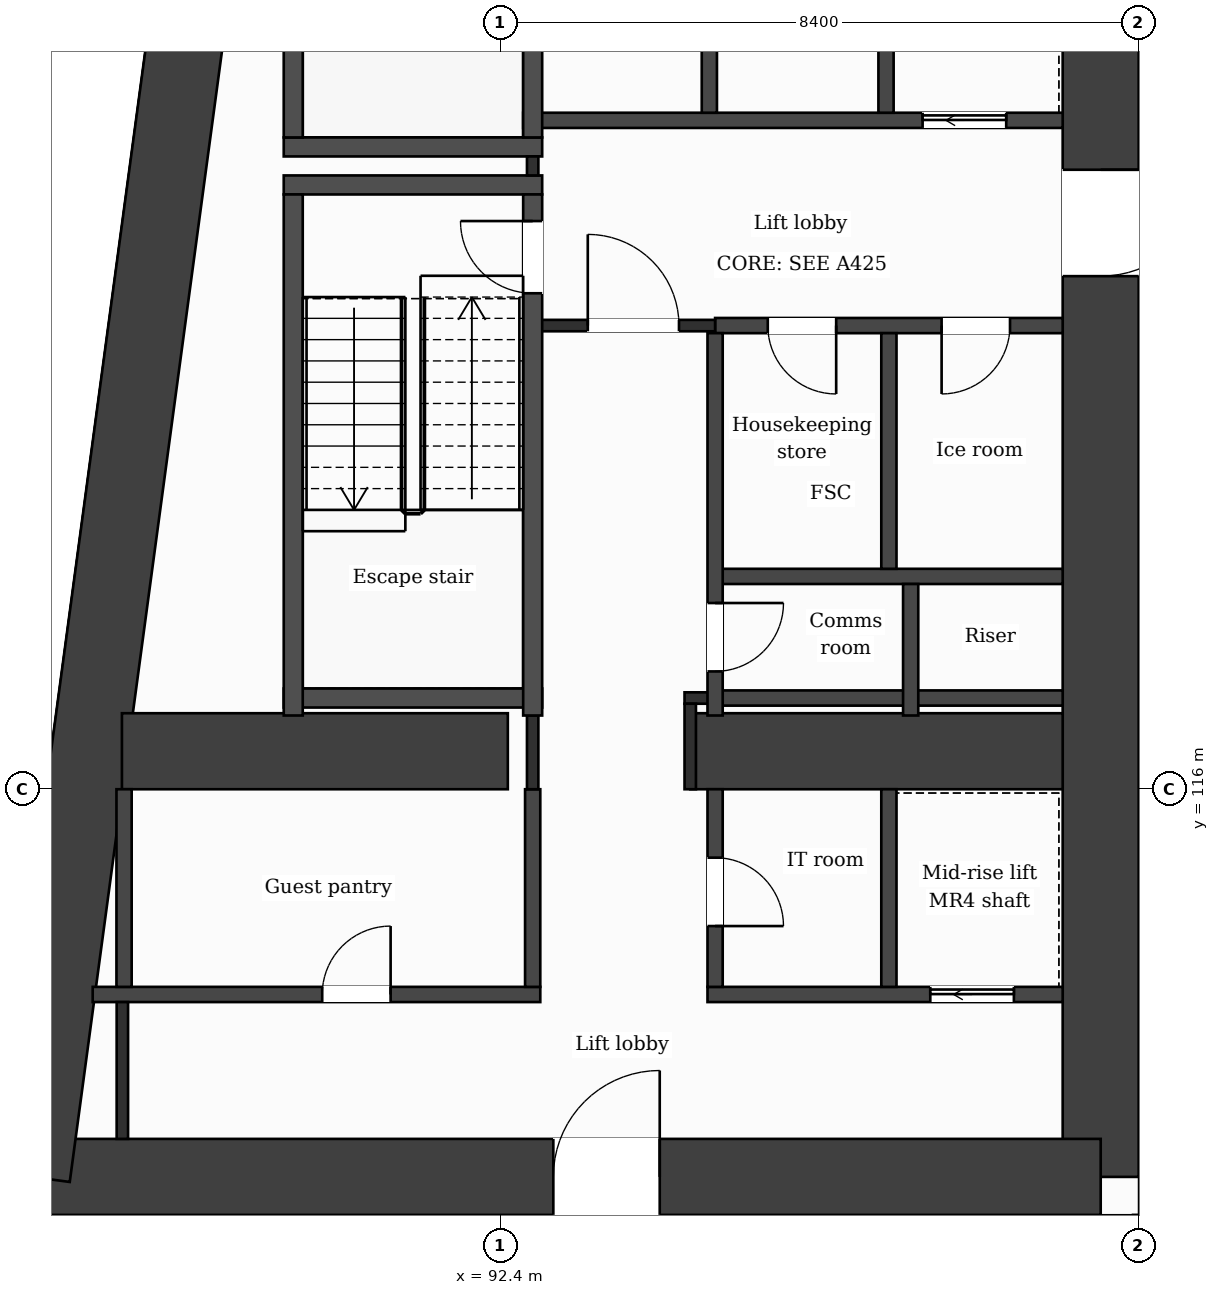
"""IFC4 building model, lengths in metres.
Left out: names, types, materials, properties, quantities, classifications, styles, units other than length and angle.
Written with IfcOpenShell. Run it as: python <this file> out.ifc"""

import sys

from ifc_helpers import new_model, si_unit, direction, frame, frame_2d, origin, place, context, subcontext, project, spatial, rectangle, extrude, element, fill, save


model = new_model("IFC4")
c1 = context("Model", 3, precision=1e-05, world=origin(), true_north=direction((0.0, 1.0)))
c2 = subcontext(c1, "Body", "Model", "MODEL_VIEW")
j1 = project(units=[si_unit("LENGTHUNIT", "METRE"), si_unit("PLANEANGLEUNIT", "RADIAN")], contexts=[c1])
p1 = place(None, origin())
s1 = spatial("IfcSite", under=j1, at=p1, CompositionType="ELEMENT")
p2 = place(p1, origin())
s2 = spatial("IfcBuilding", under=s1, at=p2, CompositionType="ELEMENT")
p3 = place(p2, frame((0.0, 0.0, 105.8)))
s3 = spatial("IfcBuildingStorey", under=s2, at=p3, CompositionType="ELEMENT", Elevation=105.8)
p4 = place(p3, frame((100.3, 131.9, 0.0), z_axis=(0.0, 0.0, 1.0), x_axis=(0.0, -1.0, 0.0)))
e1 = element("IfcWall", 1, at=p4, inside=s3, PredefinedType="SHEAR", context=c2, shape_type="SweptSolid", body=[
    extrude(rectangle(XDim=21.0, YDim=1.0, at=frame_2d((10.5, 0.0))), origin(), (0.0, 0.0, 1.0), 3.7),
])
p5 = place(p4, frame((7.75, 0.0, 0.0)))
e2 = element("IfcOpeningElement", 2, at=p5, cuts=e1, PredefinedType="OPENING", context=c2, shape_type="SweptSolid", body=[
    extrude(rectangle(XDim=1.4, YDim=2.1, at=frame_2d((0.7, 1.05))), frame((0.0, 0.51, 0.0), z_axis=(0.0, -1.0, 0.0), x_axis=(1.0, 0.0, 0.0)), (0.0, 0.0, 1.0), 1.02),
])
p6 = place(p3, frame((100.3, 110.9, 0.0), z_axis=(0.0, 0.0, 1.0), x_axis=(-1.0, 0.0, 0.0)))
e3 = element("IfcWall", 3, at=p6, inside=s3, PredefinedType="SHEAR", context=c2, shape_type="SweptSolid", body=[
    extrude(rectangle(XDim=14.059, YDim=1.0, at=frame_2d((7.03, 0.0))), origin(), (0.0, 0.0, 1.0), 3.7),
])
p7 = place(p6, frame((5.802, 0.0, 0.0)))
e4 = element("IfcOpeningElement", 4, at=p7, cuts=e3, PredefinedType="OPENING", context=c2, shape_type="SweptSolid", body=[
    extrude(rectangle(XDim=1.4, YDim=2.1, at=frame_2d((0.7, 1.05))), frame((0.0, 0.51, 0.0), z_axis=(0.0, -1.0, 0.0), x_axis=(1.0, 0.0, 0.0)), (0.0, 0.0, 1.0), 1.02),
])
p8 = place(p3, frame((86.241, 110.9, 0.0), z_axis=(0.0, 0.0, 1.0), x_axis=(0.133411141623, 0.991060778808, 0.0)))
e5 = element("IfcWall", 5, at=p8, inside=s3, PredefinedType="SHEAR", context=c2, shape_type="SweptSolid", body=[
    extrude(rectangle(XDim=21.189, YDim=1.0, at=frame_2d((10.595, 0.0))), origin(), (0.0, 0.0, 1.0), 3.7),
])
p9 = place(p3, frame((87.423, 116.5, 0.0), z_axis=(0.0, 0.0, 1.0), x_axis=(1.0, 0.0, 0.0)))
e6 = element("IfcWall", 6, at=p9, inside=s3, PredefinedType="SHEAR", context=c2, shape_type="SweptSolid", body=[
    extrude(rectangle(XDim=5.077, YDim=1.0, at=frame_2d((2.539, 0.0))), origin(), (0.0, 0.0, 1.0), 3.7),
])
p10 = place(p3, frame((94.9, 116.5, 0.0), z_axis=(0.0, 0.0, 1.0), x_axis=(1.0, 0.0, 0.0)))
e7 = element("IfcWall", 7, at=p10, inside=s3, PredefinedType="SHEAR", context=c2, shape_type="SweptSolid", body=[
    extrude(rectangle(XDim=4.9, YDim=1.0, at=frame_2d((2.45, 0.0))), origin(), (0.0, 0.0, 1.0), 3.7),
])
p11 = place(p3, frame((87.334, 110.4, 0.0), z_axis=(0.0, 0.0, 1.0), x_axis=(-0.133437175554, -0.991057273915, 0.0)))
e8 = element("IfcWall", 8, at=p11, inside=s3, PredefinedType="SOLIDWALL", context=c2, shape_type="SweptSolid", body=[
    extrude(rectangle(XDim=6.781, YDim=0.3, at=frame_2d((3.39, 0.0))), origin(), (0.0, 0.0, 1.0), 3.38),
])
p12 = place(p11, frame((1.418, 0.0, 0.0)))
e9 = element("IfcOpeningElement", 9, at=p12, cuts=e8, PredefinedType="OPENING", context=c2, shape_type="SweptSolid", body=[
    extrude(rectangle(XDim=1.2, YDim=2.4, at=frame_2d((0.6, 1.2))), frame((0.0, 0.16, 0.0), z_axis=(0.0, -1.0, 0.0), x_axis=(1.0, 0.0, 0.0)), (0.0, 0.0, 1.0), 0.32),
])
p13 = place(p11, frame((4.758, 0.0, 0.9)))
e10 = element("IfcOpeningElement", 10, at=p13, cuts=e8, PredefinedType="OPENING", context=c2, shape_type="SweptSolid", body=[
    extrude(rectangle(XDim=1.2, YDim=2.1, at=frame_2d((0.6, 1.05))), frame((0.0, 0.16, 0.0), z_axis=(0.0, -1.0, 0.0), x_axis=(1.0, 0.0, 0.0)), (0.0, 0.0, 1.0), 0.32),
])
p14 = place(p3, frame((87.039, 113.3, 0.0), z_axis=(0.0, 0.0, 1.0), x_axis=(1.0, 0.0, 0.0)))
e11 = element("IfcWall", 11, at=p14, inside=s3, PredefinedType="PARTITIONING", context=c2, shape_type="SweptSolid", body=[
    extrude(rectangle(XDim=5.888, YDim=0.2, at=frame_2d((2.944, 0.0))), origin(), (0.0, 0.0, 1.0), 3.38),
])
p15 = place(p14, frame((3.019, 0.0, 0.0)))
e12 = element("IfcOpeningElement", 12, at=p15, cuts=e11, PredefinedType="OPENING", context=c2, shape_type="SweptSolid", body=[
    extrude(rectangle(XDim=0.9, YDim=2.1, at=frame_2d((0.45, 1.05))), frame((0.0, 0.11, 0.0), z_axis=(0.0, -1.0, 0.0), x_axis=(1.0, 0.0, 0.0)), (0.0, 0.0, 1.0), 0.22),
])
p16 = place(p3, frame((95.127, 113.3, 0.0), z_axis=(0.0, 0.0, 1.0), x_axis=(1.0, 0.0, 0.0)))
e13 = element("IfcWall", 13, at=p16, inside=s3, PredefinedType="PARTITIONING", context=c2, shape_type="SweptSolid", body=[
    extrude(rectangle(XDim=4.673, YDim=0.2, at=frame_2d((2.336, 0.0))), origin(), (0.0, 0.0, 1.0), 3.38),
])
p17 = place(p16, frame((2.931, 0.0, 0.0)))
e14 = element("IfcOpeningElement", 14, at=p17, cuts=e13, PredefinedType="OPENING", context=c2, shape_type="SweptSolid", body=[
    extrude(rectangle(XDim=1.1, YDim=2.1, at=frame_2d((0.55, 1.05))), frame((0.0, 0.11, 0.0), z_axis=(0.0, -1.0, 0.0), x_axis=(1.0, 0.0, 0.0)), (0.0, 0.0, 1.0), 0.22),
])
p18 = place(p3, frame((95.227, 117.2, 0.0), z_axis=(0.0, 0.0, 1.0), x_axis=(1.0, 0.0, 0.0)))
e15 = element("IfcWall", 15, at=p18, inside=s3, PredefinedType="PARTITIONING", context=c2, shape_type="SweptSolid", body=[
    extrude(rectangle(XDim=4.573, YDim=0.2, at=frame_2d((2.287, 0.0))), origin(), (0.0, 0.0, 1.0), 3.38),
])
p19 = place(p3, frame((94.825, 117.2, 0.0), z_axis=(0.0, 0.0, 1.0), x_axis=(1.0, 0.0, 0.0)))
e16 = element("IfcWall", 16, at=p19, inside=s3, PredefinedType="PARTITIONING", context=c2, shape_type="SweptSolid", body=[
    extrude(rectangle(XDim=0.402, YDim=0.15, at=frame_2d((0.201, 0.0))), origin(), (0.0, 0.0, 1.0), 3.38),
])
p20 = place(p3, frame((89.552, 117.2, 0.0), z_axis=(0.0, 0.0, 1.0), x_axis=(1.0, 0.0, 0.0)))
e17 = element("IfcWall", 17, at=p20, inside=s3, PredefinedType="PARTITIONING", context=c2, shape_type="SweptSolid", body=[
    extrude(rectangle(XDim=3.4, YDim=0.25, at=frame_2d((1.7, 0.0))), origin(), (0.0, 0.0, 1.0), 3.38),
])
p21 = place(p3, frame((95.227, 118.8, 0.0), z_axis=(0.0, 0.0, 1.0), x_axis=(1.0, 0.0, 0.0)))
e18 = element("IfcWall", 18, at=p21, inside=s3, PredefinedType="PARTITIONING", context=c2, shape_type="SweptSolid", body=[
    extrude(rectangle(XDim=4.573, YDim=0.2, at=frame_2d((2.287, 0.0))), origin(), (0.0, 0.0, 1.0), 3.38),
])
p22 = place(p3, frame((95.227, 122.1, 0.0), z_axis=(0.0, 0.0, 1.0), x_axis=(1.0, 0.0, 0.0)))
e19 = element("IfcWall", 19, at=p22, inside=s3, PredefinedType="PARTITIONING", context=c2, shape_type="SweptSolid", body=[
    extrude(rectangle(XDim=4.573, YDim=0.2, at=frame_2d((2.287, 0.0))), origin(), (0.0, 0.0, 1.0), 3.38),
])
p23 = place(p22, frame((0.693, 0.0, 0.0)))
e20 = element("IfcOpeningElement", 20, at=p23, cuts=e19, PredefinedType="OPENING", context=c2, shape_type="SweptSolid", body=[
    extrude(rectangle(XDim=0.9, YDim=2.1, at=frame_2d((0.45, 1.05))), frame((0.0, 0.11, 0.0), z_axis=(0.0, -1.0, 0.0), x_axis=(1.0, 0.0, 0.0)), (0.0, 0.0, 1.0), 0.22),
])
p24 = place(p22, frame((2.98, 0.0, 0.0)))
e21 = element("IfcOpeningElement", 21, at=p24, cuts=e19, PredefinedType="OPENING", context=c2, shape_type="SweptSolid", body=[
    extrude(rectangle(XDim=0.9, YDim=2.1, at=frame_2d((0.45, 1.05))), frame((0.0, 0.11, 0.0), z_axis=(0.0, -1.0, 0.0), x_axis=(1.0, 0.0, 0.0)), (0.0, 0.0, 1.0), 0.22),
])
p25 = place(p3, frame((92.827, 122.1, 0.0), z_axis=(0.0, 0.0, 1.0), x_axis=(1.0, 0.0, 0.0)))
e22 = element("IfcWall", 22, at=p25, inside=s3, PredefinedType="PARTITIONING", context=c2, shape_type="SweptSolid", body=[
    extrude(rectangle(XDim=2.4, YDim=0.15, at=frame_2d((1.2, 0.0))), origin(), (0.0, 0.0, 1.0), 3.38),
])
p26 = place(p25, frame((0.725, 0.0, 0.0)))
e23 = element("IfcOpeningElement", 23, at=p26, cuts=e22, PredefinedType="OPENING", context=c2, shape_type="SweptSolid", body=[
    extrude(rectangle(XDim=1.2, YDim=2.1, at=frame_2d((0.6, 1.05))), frame((0.0, 0.085, 0.0), z_axis=(0.0, -1.0, 0.0), x_axis=(1.0, 0.0, 0.0)), (0.0, 0.0, 1.0), 0.17),
])
for number, where, z_axis, x_axis in (
    (24, (89.552, 123.95, 0.0), (0.0, 0.0, 1.0), (1.0, 0.0, 0.0)),
    (25, (89.552, 124.45, 0.0), (0.0, 0.0, 1.0), (1.0, 0.0, 0.0)),
):
    element("IfcWall", number, at=place(p3, frame(where, z_axis=z_axis, x_axis=x_axis)), inside=s3, PredefinedType="PARTITIONING", context=c2, shape_type="SweptSolid", body=[
        extrude(rectangle(XDim=3.4, YDim=0.25, at=frame_2d((1.7, 0.0))), origin(), (0.0, 0.0, 1.0), 3.38),
    ])
p27 = place(p3, frame((92.702, 124.8, 0.0), z_axis=(0.0, 0.0, 1.0), x_axis=(1.0, 0.0, 0.0)))
e26 = element("IfcWall", 26, at=p27, inside=s3, PredefinedType="PARTITIONING", context=c2, shape_type="SweptSolid", body=[
    extrude(rectangle(XDim=7.098, YDim=0.2, at=frame_2d((3.549, 0.0))), origin(), (0.0, 0.0, 1.0), 3.38),
])
p28 = place(p27, frame((5.255, 0.0, 0.0)))
e27 = element("IfcOpeningElement", 27, at=p28, cuts=e26, PredefinedType="OPENING", context=c2, shape_type="SweptSolid", body=[
    extrude(rectangle(XDim=1.1, YDim=2.1, at=frame_2d((0.55, 1.05))), frame((0.0, 0.11, 0.0), z_axis=(0.0, -1.0, 0.0), x_axis=(1.0, 0.0, 0.0)), (0.0, 0.0, 1.0), 0.22),
])
p29 = place(p3, frame((87.451, 113.4, 0.0), z_axis=(0.0, 0.0, 1.0), x_axis=(0.0, 1.0, 0.0)))
e28 = element("IfcWall", 28, at=p29, inside=s3, PredefinedType="PARTITIONING", context=c2, shape_type="SweptSolid", body=[
    extrude(rectangle(XDim=2.6, YDim=0.2, at=frame_2d((1.3, 0.0))), origin(), (0.0, 0.0, 1.0), 3.38),
])
p30 = place(p3, frame((87.429, 111.4, 0.0), z_axis=(0.0, 0.0, 1.0), x_axis=(0.0, 1.0, 0.0)))
e29 = element("IfcWall", 29, at=p30, inside=s3, PredefinedType="PARTITIONING", context=c2, shape_type="SweptSolid", body=[
    extrude(rectangle(XDim=1.8, YDim=0.15, at=frame_2d((0.9, 0.0))), origin(), (0.0, 0.0, 1.0), 3.38),
])
for number, where, z_axis, x_axis in (
    (30, (89.677, 116.97, 0.0), (0.0, 0.0, 1.0), (0.0, 1.0, 0.0)),
    (31, (89.677, 124.575, 0.0), (0.0, 0.0, 1.0), (0.0, 1.0, 0.0)),
):
    element("IfcWall", number, at=place(p3, frame(where, z_axis=z_axis, x_axis=x_axis)), inside=s3, PredefinedType="PARTITIONING", context=c2, shape_type="SweptSolid", body=[
        extrude(rectangle(XDim=6.855, YDim=0.25, at=frame_2d((3.427, 0.0))), origin(), (0.0, 0.0, 1.0), 3.38),
    ])
p31 = place(p3, frame((92.827, 113.4, 0.0), z_axis=(0.0, 0.0, 1.0), x_axis=(0.0, 1.0, 0.0)))
e32 = element("IfcWall", 32, at=p31, inside=s3, PredefinedType="PARTITIONING", context=c2, shape_type="SweptSolid", body=[
    extrude(rectangle(XDim=2.6, YDim=0.2, at=frame_2d((1.3, 0.0))), origin(), (0.0, 0.0, 1.0), 3.38),
])
p32 = place(p3, frame((92.827, 116.0, 0.0), z_axis=(0.0, 0.0, 1.0), x_axis=(0.0, 1.0, 0.0)))
e33 = element("IfcWall", 33, at=p32, inside=s3, PredefinedType="PARTITIONING", context=c2, shape_type="SweptSolid", body=[
    extrude(rectangle(XDim=0.97, YDim=0.15, at=frame_2d((0.485, 0.0))), origin(), (0.0, 0.0, 1.0), 3.38),
])
p33 = place(p3, frame((92.827, 124.075, 0.0), z_axis=(0.0, 0.0, 1.0), x_axis=(0.0, 1.0, 0.0)))
e34 = element("IfcWall", 34, at=p33, inside=s3, PredefinedType="PARTITIONING", context=c2, shape_type="SweptSolid", body=[
    extrude(rectangle(XDim=0.25, YDim=0.15, at=frame_2d((0.125, 0.0))), origin(), (0.0, 0.0, 1.0), 3.38),
])
p34 = place(p3, frame((92.827, 116.97, 0.0), z_axis=(0.0, 0.0, 1.0), x_axis=(0.0, 1.0, 0.0)))
e35 = element("IfcWall", 35, at=p34, inside=s3, PredefinedType="PARTITIONING", context=c2, shape_type="SweptSolid", body=[
    extrude(rectangle(XDim=6.855, YDim=0.25, at=frame_2d((3.427, 0.0))), origin(), (0.0, 0.0, 1.0), 3.38),
])
p35 = place(p34, frame((5.555, 0.0, 0.0)))
e36 = element("IfcOpeningElement", 36, at=p35, cuts=e35, PredefinedType="OPENING", context=c2, shape_type="SweptSolid", body=[
    extrude(rectangle(XDim=0.95, YDim=2.1, at=frame_2d((0.475, 1.05))), frame((0.0, 0.135, 0.0), z_axis=(0.0, -1.0, 0.0), x_axis=(1.0, 0.0, 0.0)), (0.0, 0.0, 1.0), 0.27),
])
p36 = place(p3, frame((92.827, 124.575, 0.0), z_axis=(0.0, 0.0, 1.0), x_axis=(0.0, 1.0, 0.0)))
e37 = element("IfcWall", 37, at=p36, inside=s3, PredefinedType="PARTITIONING", context=c2, shape_type="SweptSolid", body=[
    extrude(rectangle(XDim=6.855, YDim=0.25, at=frame_2d((3.427, 0.0))), origin(), (0.0, 0.0, 1.0), 3.38),
])
p37 = place(p36, frame((5.325, 0.0, 0.0)))
e38 = element("IfcOpeningElement", 38, at=p37, cuts=e37, PredefinedType="OPENING", context=c2, shape_type="SweptSolid", body=[
    extrude(rectangle(XDim=1.0, YDim=2.1, at=frame_2d((0.5, 1.05))), frame((0.0, 0.135, 0.0), z_axis=(0.0, -1.0, 0.0), x_axis=(1.0, 0.0, 0.0)), (0.0, 0.0, 1.0), 0.27),
])
p38 = place(p3, frame((94.9, 116.0, 0.0), z_axis=(0.0, 0.0, 1.0), x_axis=(0.0, 1.0, 0.0)))
e39 = element("IfcWall", 39, at=p38, inside=s3, PredefinedType="PARTITIONING", context=c2, shape_type="SweptSolid", body=[
    extrude(rectangle(XDim=1.125, YDim=0.15, at=frame_2d((0.562, 0.0))), origin(), (0.0, 0.0, 1.0), 3.38),
])
p39 = place(p3, frame((95.151, 124.9, 0.0), z_axis=(0.0, 0.0, 1.0), x_axis=(0.0, 1.0, 0.0)))
e40 = element("IfcWall", 40, at=p39, inside=s3, PredefinedType="PARTITIONING", context=c2, shape_type="SweptSolid", body=[
    extrude(rectangle(XDim=3.1, YDim=0.2, at=frame_2d((1.55, 0.0))), origin(), (0.0, 0.0, 1.0), 3.38),
])
p40 = place(p3, frame((95.227, 113.4, 0.0), z_axis=(0.0, 0.0, 1.0), x_axis=(0.0, 1.0, 0.0)))
e41 = element("IfcWall", 41, at=p40, inside=s3, PredefinedType="PARTITIONING", context=c2, shape_type="SweptSolid", body=[
    extrude(rectangle(XDim=2.6, YDim=0.2, at=frame_2d((1.3, 0.0))), origin(), (0.0, 0.0, 1.0), 3.38),
])
p41 = place(p40, frame((0.8, 0.0, 0.0)))
e42 = element("IfcOpeningElement", 42, at=p41, cuts=e41, PredefinedType="OPENING", context=c2, shape_type="SweptSolid", body=[
    extrude(rectangle(XDim=0.9, YDim=2.1, at=frame_2d((0.45, 1.05))), frame((0.0, 0.11, 0.0), z_axis=(0.0, -1.0, 0.0), x_axis=(1.0, 0.0, 0.0)), (0.0, 0.0, 1.0), 0.22),
])
p42 = place(p3, frame((95.227, 116.97, 0.0), z_axis=(0.0, 0.0, 1.0), x_axis=(0.0, 1.0, 0.0)))
e43 = element("IfcWall", 43, at=p42, inside=s3, PredefinedType="PARTITIONING", context=c2, shape_type="SweptSolid", body=[
    extrude(rectangle(XDim=5.03, YDim=0.2, at=frame_2d((2.515, 0.0))), origin(), (0.0, 0.0, 1.0), 3.38),
])
p43 = place(p42, frame((0.58, 0.0, 0.0)))
e44 = element("IfcOpeningElement", 44, at=p43, cuts=e43, PredefinedType="OPENING", context=c2, shape_type="SweptSolid", body=[
    extrude(rectangle(XDim=0.9, YDim=2.1, at=frame_2d((0.45, 1.05))), frame((0.0, 0.11, 0.0), z_axis=(0.0, -1.0, 0.0), x_axis=(1.0, 0.0, 0.0)), (0.0, 0.0, 1.0), 0.22),
])
p44 = place(p3, frame((97.476, 124.9, 0.0), z_axis=(0.0, 0.0, 1.0), x_axis=(0.0, 1.0, 0.0)))
e45 = element("IfcWall", 45, at=p44, inside=s3, PredefinedType="PARTITIONING", context=c2, shape_type="SweptSolid", body=[
    extrude(rectangle(XDim=3.1, YDim=0.2, at=frame_2d((1.55, 0.0))), origin(), (0.0, 0.0, 1.0), 3.38),
])
p45 = place(p3, frame((97.513, 113.4, 0.0), z_axis=(0.0, 0.0, 1.0), x_axis=(0.0, 1.0, 0.0)))
e46 = element("IfcWall", 46, at=p45, inside=s3, PredefinedType="PARTITIONING", context=c2, shape_type="SweptSolid", body=[
    extrude(rectangle(XDim=2.6, YDim=0.2, at=frame_2d((1.3, 0.0))), origin(), (0.0, 0.0, 1.0), 3.38),
])
p46 = place(p3, frame((97.513, 118.9, 0.0), z_axis=(0.0, 0.0, 1.0), x_axis=(0.0, 1.0, 0.0)))
e47 = element("IfcWall", 47, at=p46, inside=s3, PredefinedType="PARTITIONING", context=c2, shape_type="SweptSolid", body=[
    extrude(rectangle(XDim=3.1, YDim=0.2, at=frame_2d((1.55, 0.0))), origin(), (0.0, 0.0, 1.0), 3.38),
])
p47 = place(p3, frame((97.8, 116.97, 0.0), z_axis=(0.0, 0.0, 1.0), x_axis=(0.0, 1.0, 0.0)))
e48 = element("IfcWall", 48, at=p47, inside=s3, PredefinedType="PARTITIONING", context=c2, shape_type="SweptSolid", body=[
    extrude(rectangle(XDim=1.73, YDim=0.2, at=frame_2d((0.865, 0.0))), origin(), (0.0, 0.0, 1.0), 3.38),
])
p48 = place(p3, frame((100.8, 109.075, 0.0), z_axis=(0.0, 0.0, 1.0), x_axis=(0.0, 1.0, 0.0)))
e49 = element("IfcWall", 49, at=p48, inside=s3, PredefinedType="PARTITIONING", context=c2, shape_type="SweptSolid", body=[
    extrude(rectangle(XDim=1.325, YDim=0.15, at=frame_2d((0.663, 0.0))), origin(), (0.0, 0.0, 1.0), 3.38),
])
p49 = place(p26, origin())
e50 = element("IfcDoor", 50, at=p49, inside=s3, OperationType="SINGLE_SWING_LEFT", PredefinedType="DOOR", context=c2, shape_type="SweptSolid", body=[
    extrude(rectangle(XDim=1.2, YDim=2.1, at=frame_2d((0.6, 1.05))), frame((0.0, 0.025, 0.0), z_axis=(0.0, -1.0, 0.0), x_axis=(1.0, 0.0, 0.0)), (0.0, 0.0, 1.0), 0.05),
])
fill(e23, e50)
p50 = place(p28, origin())
e51 = element("IfcDoor", 51, at=p50, inside=s3, OperationType="SLIDING_TO_LEFT", PredefinedType="DOOR", context=c2, shape_type="SweptSolid", body=[
    extrude(rectangle(XDim=1.1, YDim=2.1, at=frame_2d((0.55, 1.05))), frame((0.0, 0.025, 0.0), z_axis=(0.0, -1.0, 0.0), x_axis=(1.0, 0.0, 0.0)), (0.0, 0.0, 1.0), 0.05),
])
fill(e27, e51)
p51 = place(p23, origin())
e52 = element("IfcDoor", 52, at=p51, inside=s3, OperationType="SINGLE_SWING_RIGHT", PredefinedType="DOOR", context=c2, shape_type="SweptSolid", body=[
    extrude(rectangle(XDim=0.9, YDim=2.1, at=frame_2d((0.45, 1.05))), frame((0.0, 0.025, 0.0), z_axis=(0.0, -1.0, 0.0), x_axis=(1.0, 0.0, 0.0)), (0.0, 0.0, 1.0), 0.05),
])
fill(e20, e52)
p52 = place(p24, origin())
e53 = element("IfcDoor", 53, at=p52, inside=s3, OperationType="SINGLE_SWING_LEFT", PredefinedType="DOOR", context=c2, shape_type="SweptSolid", body=[
    extrude(rectangle(XDim=0.9, YDim=2.1, at=frame_2d((0.45, 1.05))), frame((0.0, 0.025, 0.0), z_axis=(0.0, -1.0, 0.0), x_axis=(1.0, 0.0, 0.0)), (0.0, 0.0, 1.0), 0.05),
])
fill(e21, e53)
p53 = place(p35, origin())
e54 = element("IfcDoor", 54, at=p53, inside=s3, OperationType="SINGLE_SWING_RIGHT", PredefinedType="DOOR", context=c2, shape_type="SweptSolid", body=[
    extrude(rectangle(XDim=0.95, YDim=2.1, at=frame_2d((0.475, 1.05))), frame((0.0, 0.025, 0.0), z_axis=(0.0, -1.0, 0.0), x_axis=(1.0, 0.0, 0.0)), (0.0, 0.0, 1.0), 0.05),
])
fill(e36, e54)
p54 = place(p43, origin())
e55 = element("IfcDoor", 55, at=p54, inside=s3, OperationType="SINGLE_SWING_RIGHT", PredefinedType="DOOR", context=c2, shape_type="SweptSolid", body=[
    extrude(rectangle(XDim=0.9, YDim=2.1, at=frame_2d((0.45, 1.05))), frame((0.0, 0.025, 0.0), z_axis=(0.0, -1.0, 0.0), x_axis=(1.0, 0.0, 0.0)), (0.0, 0.0, 1.0), 0.05),
])
fill(e44, e55)
p55 = place(p17, origin())
e56 = element("IfcDoor", 56, at=p55, inside=s3, OperationType="SLIDING_TO_LEFT", PredefinedType="DOOR", context=c2, shape_type="SweptSolid", body=[
    extrude(rectangle(XDim=1.1, YDim=2.1, at=frame_2d((0.55, 1.05))), frame((0.0, 0.025, 0.0), z_axis=(0.0, -1.0, 0.0), x_axis=(1.0, 0.0, 0.0)), (0.0, 0.0, 1.0), 0.05),
])
fill(e14, e56)
p56 = place(p15, origin())
e57 = element("IfcDoor", 57, at=p56, inside=s3, OperationType="SINGLE_SWING_RIGHT", PredefinedType="DOOR", context=c2, shape_type="SweptSolid", body=[
    extrude(rectangle(XDim=0.9, YDim=2.1, at=frame_2d((0.45, 1.05))), frame((0.0, 0.025, 0.0), z_axis=(0.0, -1.0, 0.0), x_axis=(1.0, 0.0, 0.0)), (0.0, 0.0, 1.0), 0.05),
])
fill(e12, e57)
p57 = place(p41, origin())
e58 = element("IfcDoor", 58, at=p57, inside=s3, OperationType="SINGLE_SWING_LEFT", PredefinedType="DOOR", context=c2, shape_type="SweptSolid", body=[
    extrude(rectangle(XDim=0.9, YDim=2.1, at=frame_2d((0.45, 1.05))), frame((0.0, 0.025, 0.0), z_axis=(0.0, -1.0, 0.0), x_axis=(1.0, 0.0, 0.0)), (0.0, 0.0, 1.0), 0.05),
])
fill(e42, e58)
p58 = place(p7, origin())
e59 = element("IfcDoor", 59, at=p58, inside=s3, OperationType="SINGLE_SWING_LEFT", PredefinedType="DOOR", context=c2, shape_type="SweptSolid", body=[
    extrude(rectangle(XDim=1.4, YDim=2.1, at=frame_2d((0.7, 1.05))), frame((0.0, 0.025, 0.0), z_axis=(0.0, -1.0, 0.0), x_axis=(1.0, 0.0, 0.0)), (0.0, 0.0, 1.0), 0.05),
])
fill(e4, e59)
p59 = place(p5, origin())
e60 = element("IfcDoor", 60, at=p59, inside=s3, OperationType="SINGLE_SWING_LEFT", PredefinedType="DOOR", context=c2, shape_type="SweptSolid", body=[
    extrude(rectangle(XDim=1.4, YDim=2.1, at=frame_2d((0.7, 1.05))), frame((0.0, 0.025, 0.0), z_axis=(0.0, -1.0, 0.0), x_axis=(1.0, 0.0, 0.0)), (0.0, 0.0, 1.0), 0.05),
])
fill(e2, e60)
save(model, sys.argv[1])
